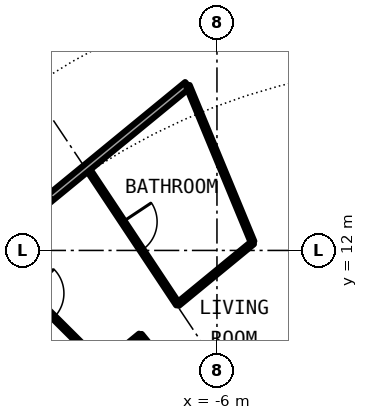
"""IFC4 building model, lengths in metres.
Left out: names, types, materials, properties, quantities, classifications, styles, units other than length and angle.
Written with IfcOpenShell. Run it as: python <this file> out.ifc"""

import sys

from ifc_helpers import new_model, si_unit, direction, frame, frame_2d, origin, place, context, subcontext, project, spatial, rectangle, extrude, element, fill, save


model = new_model("IFC4")
c1 = context("Model", 3, precision=1e-05, world=origin(), true_north=direction((0.0, 1.0)))
c2 = subcontext(c1, "Body", "Model", "MODEL_VIEW")
j1 = project(units=[si_unit("LENGTHUNIT", "METRE"), si_unit("PLANEANGLEUNIT", "RADIAN")], contexts=[c1])
p1 = place(None, origin())
s1 = spatial("IfcSite", under=j1, at=p1, CompositionType="ELEMENT")
p2 = place(p1, origin())
s2 = spatial("IfcBuilding", under=s1, at=p2, CompositionType="ELEMENT")
p3 = place(p2, frame((0.0, 0.0, 161.6)))
s3 = spatial("IfcBuildingStorey", under=s2, at=p3, CompositionType="ELEMENT", Elevation=161.6)
p4 = place(p3, frame((-12.069, 12.007, 0.0), z_axis=(0.0, 0.0, 1.0), x_axis=(0.708822693149, -0.705386695138, 0.0)))
e1 = element("IfcWall", 1, at=p4, inside=s3, PredefinedType="PARTITIONING", context=c2, shape_type="SweptSolid", body=[
    extrude(rectangle(XDim=4.121, YDim=0.1, at=frame_2d((2.061, 0.0))), origin(), (0.0, 0.0, 1.0), 2.7),
])
p5 = place(p4, frame((1.611, 0.0, 0.0)))
e2 = element("IfcOpeningElement", 2, at=p5, cuts=e1, PredefinedType="OPENING", context=c2, shape_type="SweptSolid", body=[
    extrude(rectangle(XDim=0.9, YDim=2.3, at=frame_2d((0.45, 1.15))), frame((0.0, 0.06, 0.0), z_axis=(0.0, -1.0, 0.0), x_axis=(1.0, 0.0, 0.0)), (0.0, 0.0, 1.0), 0.12),
])
p6 = place(p3, frame((-9.421, 14.18, 0.0), z_axis=(0.0, 0.0, 1.0), x_axis=(0.553303732327, -0.832979579457, 0.0)))
e3 = element("IfcWall", 3, at=p6, inside=s3, PredefinedType="PARTITIONING", context=c2, shape_type="SweptSolid", body=[
    extrude(rectangle(XDim=4.319, YDim=0.1, at=frame_2d((2.16, 0.0))), origin(), (0.0, 0.0, 1.0), 2.7),
])
p7 = place(p6, frame((1.71, 0.0, 0.0)))
e4 = element("IfcOpeningElement", 4, at=p7, cuts=e3, PredefinedType="OPENING", context=c2, shape_type="SweptSolid", body=[
    extrude(rectangle(XDim=0.9, YDim=2.3, at=frame_2d((0.45, 1.15))), frame((0.0, 0.06, 0.0), z_axis=(0.0, -1.0, 0.0), x_axis=(1.0, 0.0, 0.0)), (0.0, 0.0, 1.0), 0.12),
])
p8 = place(p3, frame((-8.019, 9.771, 0.0), z_axis=(0.0, 0.0, 1.0), x_axis=(0.634401778971, -0.773003481776, 0.0)))
e5 = element("IfcWall", 5, at=p8, inside=s3, PredefinedType="PARTITIONING", context=c2, shape_type="SweptSolid", body=[
    extrude(rectangle(XDim=4.92, YDim=0.1, at=frame_2d((2.46, 0.0))), origin(), (0.0, 0.0, 1.0), 2.7),
])
p9 = place(p8, frame((2.01, 0.0, 0.0)))
e6 = element("IfcOpeningElement", 6, at=p9, cuts=e5, PredefinedType="OPENING", context=c2, shape_type="SweptSolid", body=[
    extrude(rectangle(XDim=0.9, YDim=2.3, at=frame_2d((0.45, 1.15))), frame((0.0, 0.06, 0.0), z_axis=(0.0, -1.0, 0.0), x_axis=(1.0, 0.0, 0.0)), (0.0, 0.0, 1.0), 0.12),
])
p10 = place(p3, frame((-8.842, 9.095, 0.0), z_axis=(0.0, 0.0, 1.0), x_axis=(0.772730269942, 0.634734534995, 0.0)))
e7 = element("IfcWall", 7, at=p10, inside=s3, PredefinedType="PARTITIONING", context=c2, shape_type="SweptSolid", body=[
    extrude(rectangle(XDim=1.065, YDim=0.1, at=frame_2d((0.532, 0.0))), origin(), (0.0, 0.0, 1.0), 2.7),
])
p11 = place(p3, frame((-7.034, 10.58, 0.0), z_axis=(0.0, 0.0, 1.0), x_axis=(0.772764723682, 0.634692588449, 0.0)))
e8 = element("IfcWall", 8, at=p11, inside=s3, PredefinedType="PARTITIONING", context=c2, shape_type="SweptSolid", body=[
    extrude(rectangle(XDim=2.557, YDim=0.1, at=frame_2d((1.278, 0.0))), origin(), (0.0, 0.0, 1.0), 2.7),
])
p12 = place(p3, frame((-14.717, 9.834, 0.0), z_axis=(0.0, 0.0, 1.0), x_axis=(0.773034536097, 0.634363938131, 0.0)))
e9 = element("IfcWall", 9, at=p12, inside=s3, PredefinedType="PARTITIONING", context=c2, shape_type="SweptSolid", body=[
    extrude(rectangle(XDim=10.277, YDim=0.2, at=frame_2d((5.138, 0.0))), origin(), (0.0, 0.0, 1.0), 2.7),
])
p13 = place(p12, frame((4.638, 0.0, 0.0)))
e10 = element("IfcOpeningElement", 10, at=p13, cuts=e9, PredefinedType="OPENING", context=c2, shape_type="SweptSolid", body=[
    extrude(rectangle(XDim=1.0, YDim=2.3, at=frame_2d((0.5, 1.15))), frame((0.0, 0.11, 0.0), z_axis=(0.0, -1.0, 0.0), x_axis=(1.0, 0.0, 0.0)), (0.0, 0.0, 1.0), 0.22),
])
p14 = place(p3, frame((-6.765, 16.334, 0.0), z_axis=(0.0, 0.0, 1.0), x_axis=(0.382498794932, -0.923955990226, 0.0)))
e11 = element("IfcWall", 11, at=p14, inside=s3, PredefinedType="PARTITIONING", context=c2, shape_type="SweptSolid", body=[
    extrude(rectangle(XDim=4.449, YDim=0.1, at=frame_2d((2.225, 0.0))), origin(), (0.0, 0.0, 1.0), 2.7),
])
p15 = place(p7, origin())
e12 = element("IfcDoor", 12, at=p15, inside=s3, OperationType="SINGLE_SWING_RIGHT", PredefinedType="DOOR", context=c2, shape_type="SweptSolid", body=[
    extrude(rectangle(XDim=0.9, YDim=2.3, at=frame_2d((0.45, 1.15))), frame((0.0, 0.025, 0.0), z_axis=(0.0, -1.0, 0.0), x_axis=(1.0, 0.0, 0.0)), (0.0, 0.0, 1.0), 0.05),
])
fill(e4, e12)
p16 = place(p5, origin())
e13 = element("IfcDoor", 13, at=p16, inside=s3, OperationType="SINGLE_SWING_RIGHT", PredefinedType="DOOR", context=c2, shape_type="SweptSolid", body=[
    extrude(rectangle(XDim=0.9, YDim=2.3, at=frame_2d((0.45, 1.15))), frame((0.0, 0.025, 0.0), z_axis=(0.0, -1.0, 0.0), x_axis=(1.0, 0.0, 0.0)), (0.0, 0.0, 1.0), 0.05),
])
fill(e2, e13)
save(model, sys.argv[1])
